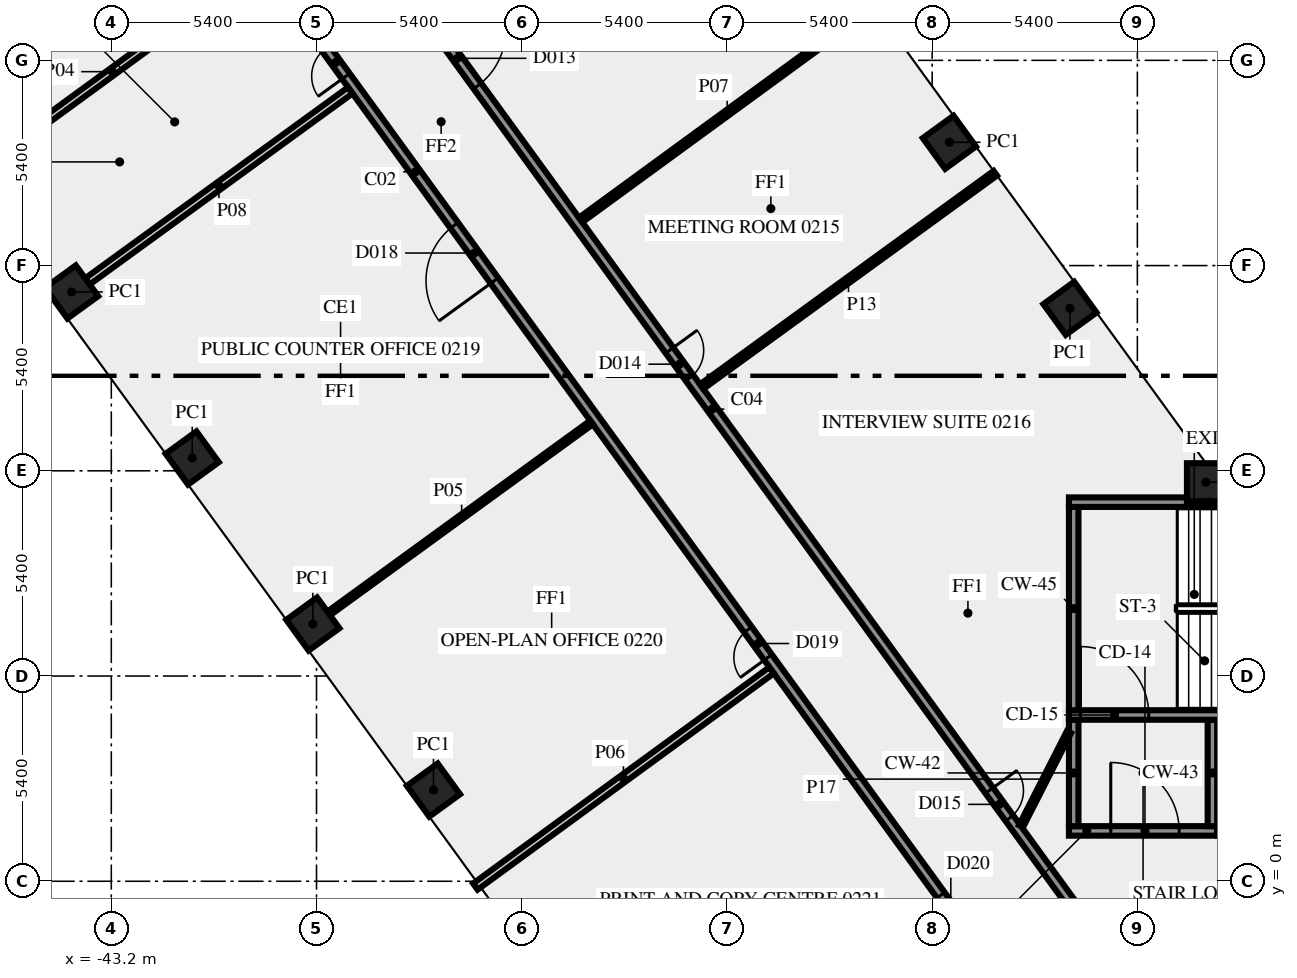
"""IFC4 building model, lengths in metres.
Left out: names, types, materials, properties, quantities, classifications, styles, units other than length and angle.
Written with IfcOpenShell. Run it as: python <this file> out.ifc"""

import sys

from ifc_helpers import new_model, si_unit, direction, frame, frame_2d, origin, origin_2d, place, context, subcontext, project, spatial, rectangle, extrude, element, fill, save


model = new_model("IFC4")
c1 = context("Model", 3, precision=1e-05, world=origin(), true_north=direction((0.0, 1.0)))
c2 = subcontext(c1, "Body", "Model", "MODEL_VIEW")
j1 = project(units=[si_unit("LENGTHUNIT", "METRE"), si_unit("PLANEANGLEUNIT", "RADIAN")], contexts=[c1])
p1 = place(None, origin())
s1 = spatial("IfcSite", under=j1, at=p1, CompositionType="ELEMENT")
p2 = place(p1, origin())
s2 = spatial("IfcBuilding", under=s1, at=p2, CompositionType="ELEMENT")
p3 = place(p2, frame((0.0, 0.0, 11.5)))
s3 = spatial("IfcBuildingStorey", under=s2, at=p3, CompositionType="ELEMENT", Elevation=11.5)
for number, where, z_axis, x_axis in (
    (1, (-17.974, 15.075, 0.0), (0.0, 0.0, 1.0), (-0.588, 0.809, 0.0)),
    (2, (-21.147, 19.444, 0.0), (0.0, 0.0, 1.0), (-0.588, 0.809, 0.0)),
    (3, (-44.244, 15.506, 0.0), (0.0, 0.0, 1.0), (0.588, -0.809, 0.0)),
    (4, (-41.07, 11.137, 0.0), (0.0, 0.0, 1.0), (0.588, -0.809, 0.0)),
    (5, (-37.896, 6.769, 0.0), (0.0, 0.0, 1.0), (0.588, -0.809, 0.0)),
    (6, (-34.722, 2.4, 0.0), (0.0, 0.0, 1.0), (0.588, -0.809, 0.0)),
    (7, (-14.395, 10.5, 0.0), (0.0, 0.0, 1.0), (-1.0, 0.0, 0.0)),
):
    element("IfcColumn", number, at=place(p3, frame(where, z_axis=z_axis, x_axis=x_axis)), inside=s3, PredefinedType="COLUMN", context=c2, shape_type="SweptSolid", body=[
        extrude(rectangle(XDim=1.0, YDim=1.0, at=origin_2d()), origin(), (0.0, 0.0, 1.0), 4.1),
    ])
p4 = place(p3, frame((-18.0, 1.325, 0.0), z_axis=(0.0, 0.0, 1.0), x_axis=(1.0, 0.0, 0.0)))
e8 = element("IfcWall", 8, at=p4, inside=s3, PredefinedType="SHEAR", context=c2, shape_type="SweptSolid", body=[
    extrude(rectangle(XDim=3.9, YDim=0.25, at=frame_2d((1.95, 0.0))), origin(), (0.0, 0.0, 1.0), 4.1),
])
p5 = place(p4, frame((1.1, 0.0, 0.0)))
e9 = element("IfcOpeningElement", 9, at=p5, cuts=e8, PredefinedType="OPENING", context=c2, shape_type="SweptSolid", body=[
    extrude(rectangle(XDim=1.8, YDim=2.1, at=frame_2d((0.9, 1.05))), frame((0.0, 0.135, 0.0), z_axis=(0.0, -1.0, 0.0), x_axis=(1.0, 0.0, 0.0)), (0.0, 0.0, 1.0), 0.27),
])
for number, where, z_axis, x_axis in (
    (10, (-17.875, 1.45, 0.0), (0.0, 0.0, 1.0), (0.0, 1.0, 0.0)),
    (11, (-14.225, 1.45, 0.0), (0.0, 0.0, 1.0), (0.0, 1.0, 0.0)),
):
    element("IfcWall", number, at=place(p3, frame(where, z_axis=z_axis, x_axis=x_axis)), inside=s3, PredefinedType="SHEAR", context=c2, shape_type="SweptSolid", body=[
        extrude(rectangle(XDim=2.8, YDim=0.25, at=frame_2d((1.4, 0.0))), origin(), (0.0, 0.0, 1.0), 4.1),
    ])
p6 = place(p3, frame((-18.0, 4.375, 0.0), z_axis=(0.0, 0.0, 1.0), x_axis=(1.0, 0.0, 0.0)))
e12 = element("IfcWall", 12, at=p6, inside=s3, PredefinedType="SHEAR", context=c2, shape_type="SweptSolid", body=[
    extrude(rectangle(XDim=10.5, YDim=0.25, at=frame_2d((5.25, 0.0))), origin(), (0.0, 0.0, 1.0), 4.1),
])
p7 = place(p6, frame((0.3, 0.0, 0.0)))
e13 = element("IfcOpeningElement", 13, at=p7, cuts=e12, PredefinedType="OPENING", context=c2, shape_type="SweptSolid", body=[
    extrude(rectangle(XDim=1.8, YDim=2.1, at=frame_2d((0.9, 1.05))), frame((0.0, 0.135, 0.0), z_axis=(0.0, -1.0, 0.0), x_axis=(1.0, 0.0, 0.0)), (0.0, 0.0, 1.0), 0.27),
])
p8 = place(p3, frame((-17.875, 4.5, 0.0), z_axis=(0.0, 0.0, 1.0), x_axis=(0.0, 1.0, 0.0)))
e14 = element("IfcWall", 14, at=p8, inside=s3, PredefinedType="SHEAR", context=c2, shape_type="SweptSolid", body=[
    extrude(rectangle(XDim=5.35, YDim=0.25, at=frame_2d((2.675, 0.0))), origin(), (0.0, 0.0, 1.0), 4.1),
])
p9 = place(p3, frame((-18.0, 9.975, 0.0), z_axis=(0.0, 0.0, 1.0), x_axis=(1.0, 0.0, 0.0)))
e15 = element("IfcWall", 15, at=p9, inside=s3, PredefinedType="SHEAR", context=c2, shape_type="SweptSolid", body=[
    extrude(rectangle(XDim=10.5, YDim=0.25, at=frame_2d((5.25, 0.0))), origin(), (0.0, 0.0, 1.0), 4.1),
])
p10 = place(p9, frame((4.5, 0.0, 1.0)))
e16 = element("IfcOpeningElement", 16, at=p10, cuts=e15, PredefinedType="OPENING", context=c2, shape_type="SweptSolid", body=[
    extrude(rectangle(XDim=1.2, YDim=1.2, at=frame_2d((0.6, 0.6))), frame((0.0, 0.135, 0.0), z_axis=(0.0, -1.0, 0.0), x_axis=(1.0, 0.0, 0.0)), (0.0, 0.0, 1.0), 0.27),
])
p11 = place(p3, frame((-20.531, -1.523, 0.0), z_axis=(0.0, 0.0, 1.0), x_axis=(-0.587784522481, 0.809017524614, 0.0)))
e17 = element("IfcWall", 17, at=p11, inside=s3, PredefinedType="SOLIDWALL", context=c2, shape_type="SweptSolid", body=[
    extrude(rectangle(XDim=49.912, YDim=0.25, at=frame_2d((24.956, 0.0))), origin(), (0.0, 0.0, 1.0), 4.1),
])
p12 = place(p11, frame((48.57, 0.0, 0.0)))
e18 = element("IfcOpeningElement", 18, at=p12, cuts=e17, PredefinedType="OPENING", context=c2, shape_type="SweptSolid", body=[
    extrude(rectangle(XDim=0.9, YDim=2.1, at=frame_2d((0.45, 1.05))), frame((0.0, 0.135, 0.0), z_axis=(0.0, -1.0, 0.0), x_axis=(1.0, 0.0, 0.0)), (0.0, 0.0, 1.0), 0.27),
])
p13 = place(p11, frame((9.165, 0.0, 0.0)))
e19 = element("IfcOpeningElement", 19, at=p13, cuts=e17, PredefinedType="OPENING", context=c2, shape_type="SweptSolid", body=[
    extrude(rectangle(XDim=0.9, YDim=2.1, at=frame_2d((0.45, 1.05))), frame((0.0, 0.135, 0.0), z_axis=(0.0, -1.0, 0.0), x_axis=(1.0, 0.0, 0.0)), (0.0, 0.0, 1.0), 0.27),
])
p14 = place(p11, frame((21.416, 0.0, 0.0)))
e20 = element("IfcOpeningElement", 20, at=p14, cuts=e17, PredefinedType="OPENING", context=c2, shape_type="SweptSolid", body=[
    extrude(rectangle(XDim=1.8, YDim=2.1, at=frame_2d((0.9, 1.05))), frame((0.0, 0.135, 0.0), z_axis=(0.0, -1.0, 0.0), x_axis=(1.0, 0.0, 0.0)), (0.0, 0.0, 1.0), 0.27),
])
p15 = place(p11, frame((28.066, 0.0, 0.0)))
e21 = element("IfcOpeningElement", 21, at=p15, cuts=e17, PredefinedType="OPENING", context=c2, shape_type="SweptSolid", body=[
    extrude(rectangle(XDim=0.9, YDim=2.1, at=frame_2d((0.45, 1.05))), frame((0.0, 0.135, 0.0), z_axis=(0.0, -1.0, 0.0), x_axis=(1.0, 0.0, 0.0)), (0.0, 0.0, 1.0), 0.27),
])
p16 = place(p11, frame((0.533, 0.0, 0.0)))
e22 = element("IfcOpeningElement", 22, at=p16, cuts=e17, PredefinedType="OPENING", context=c2, shape_type="SweptSolid", body=[
    extrude(rectangle(XDim=0.9, YDim=2.1, at=frame_2d((0.45, 1.05))), frame((0.0, 0.135, 0.0), z_axis=(0.0, -1.0, 0.0), x_axis=(1.0, 0.0, 0.0)), (0.0, 0.0, 1.0), 0.27),
])
p17 = place(p3, frame((-37.232, 25.972, 0.0), z_axis=(0.0, 0.0, 1.0), x_axis=(0.587786323093, -0.809016216391, 0.0)))
e23 = element("IfcWall", 23, at=p17, inside=s3, PredefinedType="SOLIDWALL", context=c2, shape_type="SweptSolid", body=[
    extrude(rectangle(XDim=33.493, YDim=0.25, at=frame_2d((16.747, 0.0))), origin(), (0.0, 0.0, 1.0), 4.1),
])
p18 = place(p17, frame((4.438, 0.0, 0.0)))
e24 = element("IfcOpeningElement", 24, at=p18, cuts=e23, PredefinedType="OPENING", context=c2, shape_type="SweptSolid", body=[
    extrude(rectangle(XDim=1.8, YDim=2.1, at=frame_2d((0.9, 1.05))), frame((0.0, 0.135, 0.0), z_axis=(0.0, -1.0, 0.0), x_axis=(1.0, 0.0, 0.0)), (0.0, 0.0, 1.0), 0.27),
])
p19 = place(p17, frame((29.152, 0.0, 0.0)))
e25 = element("IfcOpeningElement", 25, at=p19, cuts=e23, PredefinedType="OPENING", context=c2, shape_type="SweptSolid", body=[
    extrude(rectangle(XDim=0.9, YDim=2.1, at=frame_2d((0.45, 1.05))), frame((0.0, 0.135, 0.0), z_axis=(0.0, -1.0, 0.0), x_axis=(1.0, 0.0, 0.0)), (0.0, 0.0, 1.0), 0.27),
])
p20 = place(p17, frame((14.835, 0.0, 0.0)))
e26 = element("IfcOpeningElement", 26, at=p20, cuts=e23, PredefinedType="OPENING", context=c2, shape_type="SweptSolid", body=[
    extrude(rectangle(XDim=0.9, YDim=2.1, at=frame_2d((0.45, 1.05))), frame((0.0, 0.135, 0.0), z_axis=(0.0, -1.0, 0.0), x_axis=(1.0, 0.0, 0.0)), (0.0, 0.0, 1.0), 0.27),
])
p21 = place(p3, frame((-47.028, 18.487, 0.0), z_axis=(0.0, 0.0, 1.0), x_axis=(0.807645841498, 0.589667868135, 0.0)))
e27 = element("IfcWall", 27, at=p21, inside=s3, PredefinedType="SOLIDWALL", context=c2, shape_type="SweptSolid", body=[
    extrude(rectangle(XDim=9.551, YDim=0.2, at=frame_2d((4.775, 0.0))), origin(), (0.0, 0.0, 1.0), 3.1),
])
p22 = place(p3, frame((-30.563, 12.072, 0.0), z_axis=(0.0, 0.0, 1.0), x_axis=(-0.808992136407, -0.587819464829, 0.0)))
e28 = element("IfcWall", 28, at=p22, inside=s3, PredefinedType="PARTITIONING", context=c2, shape_type="SweptSolid", body=[
    extrude(rectangle(XDim=8.45, YDim=0.12, at=frame_2d((4.225, 0.0))), origin(), (0.0, 0.0, 1.0), 4.1),
])
p23 = place(p3, frame((-33.62, -0.14, 0.0), z_axis=(0.0, 0.0, 1.0), x_axis=(0.80760566617, 0.589722890831, 0.0)))
e29 = element("IfcWall", 29, at=p23, inside=s3, PredefinedType="SOLIDWALL", context=c2, shape_type="SweptSolid", body=[
    extrude(rectangle(XDim=9.651, YDim=0.2, at=frame_2d((4.825, 0.0))), origin(), (0.0, 0.0, 1.0), 3.1),
])
p24 = place(p3, frame((-30.85, 17.401, 0.0), z_axis=(0.0, 0.0, 1.0), x_axis=(0.807661302092, 0.589646691759, 0.0)))
e30 = element("IfcWall", 30, at=p24, inside=s3, PredefinedType="PARTITIONING", context=c2, shape_type="SweptSolid", body=[
    extrude(rectangle(XDim=9.55, YDim=0.15, at=frame_2d((4.775, 0.0))), origin(), (0.0, 0.0, 1.0), 3.1),
])
p25 = place(p3, frame((-36.911, 20.81, 0.0), z_axis=(0.0, 0.0, 1.0), x_axis=(-0.809000394931, -0.587808098789, 0.0)))
e31 = element("IfcWall", 31, at=p25, inside=s3, PredefinedType="SOLIDWALL", context=c2, shape_type="SweptSolid", body=[
    extrude(rectangle(XDim=8.545, YDim=0.2, at=frame_2d((4.272, 0.0))), origin(), (0.0, 0.0, 1.0), 4.1),
])
p26 = place(p3, frame((-19.938, 18.629, 0.0), z_axis=(0.0, 0.0, 1.0), x_axis=(-0.80900684162, -0.587799226107, 0.0)))
e32 = element("IfcWall", 32, at=p26, inside=s3, PredefinedType="PARTITIONING", context=c2, shape_type="SweptSolid", body=[
    extrude(rectangle(XDim=9.55, YDim=0.15, at=frame_2d((4.775, 0.0))), origin(), (0.0, 0.0, 1.0), 3.1),
])
p27 = place(p3, frame((-19.261, 1.45, 0.0), z_axis=(0.0, 0.0, 1.0), x_axis=(0.453950796792, 0.891026752736, 0.0)))
e33 = element("IfcWall", 33, at=p27, inside=s3, PredefinedType="PARTITIONING", context=c2, shape_type="SweptSolid", body=[
    extrude(rectangle(XDim=2.778, YDim=0.12, at=frame_2d((1.389, 0.0))), origin(), (0.0, 0.0, 1.0), 4.1),
])
p28 = place(p5, origin())
e34 = element("IfcDoor", 34, at=p28, inside=s3, OperationType="DOUBLE_DOOR_SINGLE_SWING", PredefinedType="DOOR", context=c2, shape_type="SweptSolid", body=[
    extrude(rectangle(XDim=1.8, YDim=2.1, at=frame_2d((0.9, 1.05))), frame((0.0, 0.025, 0.0), z_axis=(0.0, -1.0, 0.0), x_axis=(1.0, 0.0, 0.0)), (0.0, 0.0, 1.0), 0.05),
])
fill(e9, e34)
p29 = place(p7, origin())
e35 = element("IfcDoor", 35, at=p29, inside=s3, OperationType="DOUBLE_DOOR_SINGLE_SWING", PredefinedType="DOOR", context=c2, shape_type="SweptSolid", body=[
    extrude(rectangle(XDim=1.8, YDim=2.1, at=frame_2d((0.9, 1.05))), frame((0.0, 0.025, 0.0), z_axis=(0.0, -1.0, 0.0), x_axis=(1.0, 0.0, 0.0)), (0.0, 0.0, 1.0), 0.05),
])
fill(e13, e35)
p30 = place(p13, origin())
e36 = element("IfcDoor", 36, at=p30, inside=s3, OperationType="SINGLE_SWING_LEFT", PredefinedType="DOOR", context=c2, shape_type="SweptSolid", body=[
    extrude(rectangle(XDim=0.9, YDim=2.1, at=frame_2d((0.45, 1.05))), frame((0.0, 0.025, 0.0), z_axis=(0.0, -1.0, 0.0), x_axis=(1.0, 0.0, 0.0)), (0.0, 0.0, 1.0), 0.05),
])
fill(e19, e36)
p31 = place(p18, origin())
e37 = element("IfcDoor", 37, at=p31, inside=s3, OperationType="DOUBLE_DOOR_SINGLE_SWING", PredefinedType="DOOR", context=c2, shape_type="SweptSolid", body=[
    extrude(rectangle(XDim=1.8, YDim=2.1, at=frame_2d((0.9, 1.05))), frame((0.0, 0.025, 0.0), z_axis=(0.0, -1.0, 0.0), x_axis=(1.0, 0.0, 0.0)), (0.0, 0.0, 1.0), 0.05),
])
fill(e24, e37)
p32 = place(p14, origin())
e38 = element("IfcDoor", 38, at=p32, inside=s3, OperationType="DOUBLE_DOOR_SINGLE_SWING", PredefinedType="DOOR", context=c2, shape_type="SweptSolid", body=[
    extrude(rectangle(XDim=1.8, YDim=2.1, at=frame_2d((0.9, 1.05))), frame((0.0, 0.025, 0.0), z_axis=(0.0, -1.0, 0.0), x_axis=(1.0, 0.0, 0.0)), (0.0, 0.0, 1.0), 0.05),
])
fill(e20, e38)
p33 = place(p19, origin())
e39 = element("IfcDoor", 39, at=p33, inside=s3, OperationType="SINGLE_SWING_RIGHT", PredefinedType="DOOR", context=c2, shape_type="SweptSolid", body=[
    extrude(rectangle(XDim=0.9, YDim=2.1, at=frame_2d((0.45, 1.05))), frame((0.0, 0.025, 0.0), z_axis=(0.0, -1.0, 0.0), x_axis=(1.0, 0.0, 0.0)), (0.0, 0.0, 1.0), 0.05),
])
fill(e25, e39)
p34 = place(p20, origin())
e40 = element("IfcDoor", 40, at=p34, inside=s3, OperationType="SINGLE_SWING_RIGHT", PredefinedType="DOOR", context=c2, shape_type="SweptSolid", body=[
    extrude(rectangle(XDim=0.9, YDim=2.1, at=frame_2d((0.45, 1.05))), frame((0.0, 0.025, 0.0), z_axis=(0.0, -1.0, 0.0), x_axis=(1.0, 0.0, 0.0)), (0.0, 0.0, 1.0), 0.05),
])
fill(e26, e40)
p35 = place(p15, origin())
e41 = element("IfcDoor", 41, at=p35, inside=s3, OperationType="SINGLE_SWING_LEFT", PredefinedType="DOOR", context=c2, shape_type="SweptSolid", body=[
    extrude(rectangle(XDim=0.9, YDim=2.1, at=frame_2d((0.45, 1.05))), frame((0.0, 0.025, 0.0), z_axis=(0.0, -1.0, 0.0), x_axis=(1.0, 0.0, 0.0)), (0.0, 0.0, 1.0), 0.05),
])
fill(e21, e41)
p36 = place(p16, origin())
e42 = element("IfcDoor", 42, at=p36, inside=s3, OperationType="SINGLE_SWING_LEFT", PredefinedType="DOOR", context=c2, shape_type="SweptSolid", body=[
    extrude(rectangle(XDim=0.9, YDim=2.1, at=frame_2d((0.45, 1.05))), frame((0.0, 0.025, 0.0), z_axis=(0.0, -1.0, 0.0), x_axis=(1.0, 0.0, 0.0)), (0.0, 0.0, 1.0), 0.05),
])
fill(e22, e42)
save(model, sys.argv[1])
